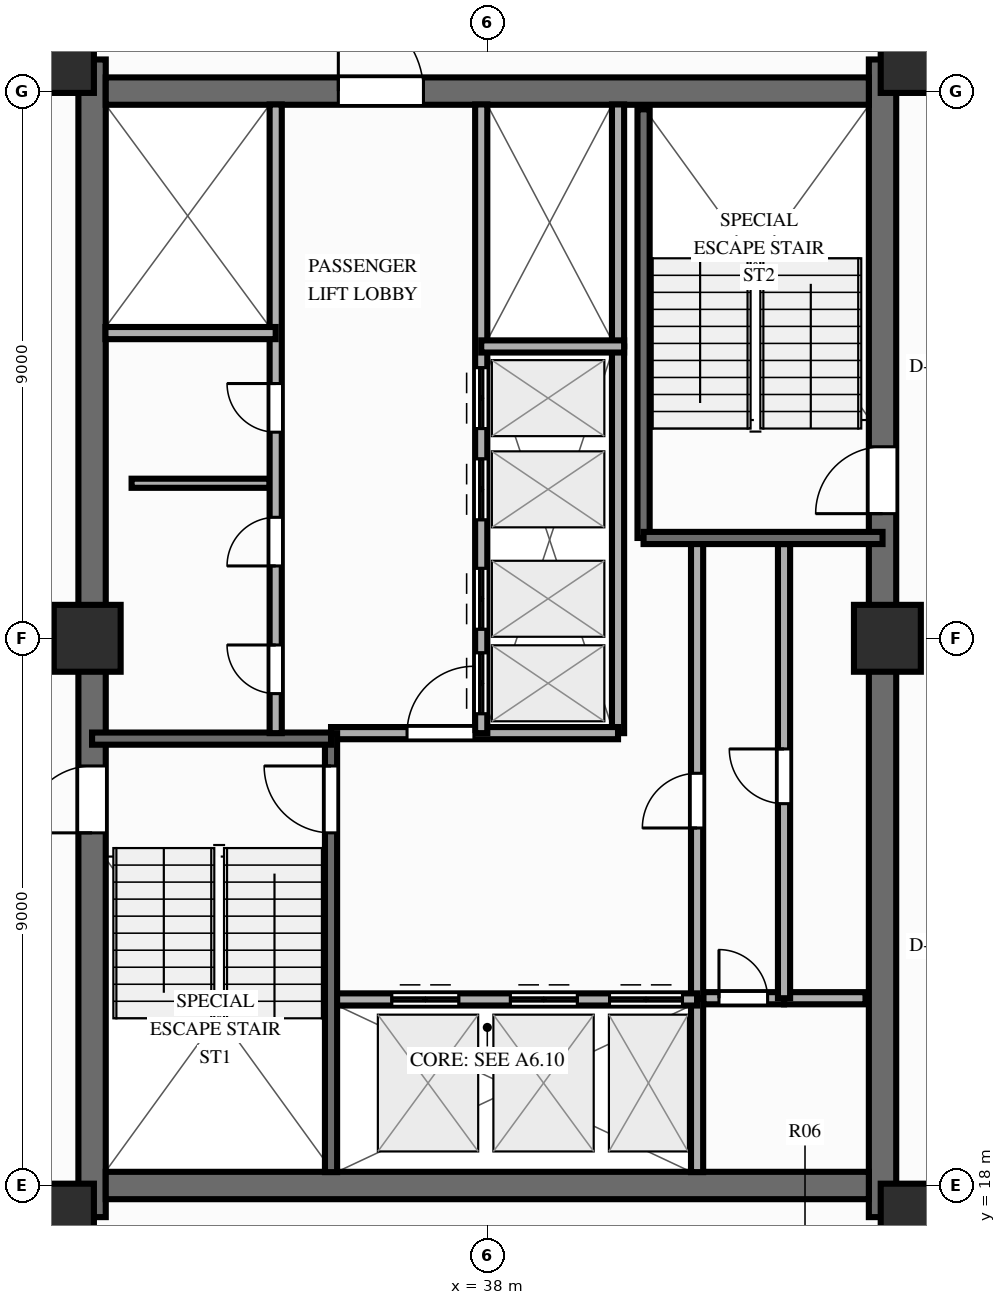
"""IFC4 building model, lengths in metres.
Left out: names, types, materials, properties, quantities, classifications, styles, units other than length and angle.
Written with IfcOpenShell. Run it as: python <this file> out.ifc"""

import sys

from ifc_helpers import new_model, si_unit, direction, frame, frame_2d, origin, origin_2d, place, context, subcontext, project, spatial, rectangle, extrude, source, transform, mapped, element, fill, save


model = new_model("IFC4")
c1 = context("Model", 3, precision=1e-05, world=origin(), true_north=direction((0.0, 1.0)))
c2 = subcontext(c1, "Body", "Model", "MODEL_VIEW")
j1 = project(units=[si_unit("LENGTHUNIT", "METRE"), si_unit("PLANEANGLEUNIT", "RADIAN")], contexts=[c1])
p1 = place(None, origin())
s1 = spatial("IfcSite", under=j1, at=p1, CompositionType="ELEMENT")
p2 = place(p1, origin())
s2 = spatial("IfcBuilding", under=s1, at=p2, CompositionType="ELEMENT")
p3 = place(p2, frame((0.0, 0.0, 152.2)))
s3 = spatial("IfcBuildingStorey", under=s2, at=p3, CompositionType="ELEMENT", Elevation=152.2)
p4 = place(p3, frame((31.5, 17.48, 0.0), z_axis=(0.0, 0.0, 1.0), x_axis=(0.0, 1.0, 0.0)))
e1 = element("IfcWall", 1, at=p4, inside=s3, PredefinedType="SHEAR", context=c2, shape_type="SweptSolid", body=[
    extrude(rectangle(XDim=19.04, YDim=0.45, at=frame_2d((9.52, 0.0))), origin(), (0.0, 0.0, 1.0), 3.9),
])
p5 = place(p4, frame((6.32, 0.0, 0.0)))
e2 = element("IfcOpeningElement", 2, at=p5, cuts=e1, PredefinedType="OPENING", context=c2, shape_type="SweptSolid", body=[
    extrude(rectangle(XDim=1.1, YDim=2.15, at=frame_2d((0.55, 1.075))), frame((0.0, 0.237, 0.0), z_axis=(0.0, -1.0, 0.0), x_axis=(1.0, 0.0, 0.0)), (0.0, 0.0, 1.0), 0.474),
])
p6 = place(p3, frame((44.5, 17.48, 0.0), z_axis=(0.0, 0.0, 1.0), x_axis=(0.0, 1.0, 0.0)))
e3 = element("IfcWall", 3, at=p6, inside=s3, PredefinedType="SHEAR", context=c2, shape_type="SweptSolid", body=[
    extrude(rectangle(XDim=19.04, YDim=0.45, at=frame_2d((9.52, 0.0))), origin(), (0.0, 0.0, 1.0), 3.9),
])
p7 = place(p6, frame((12.67, 0.0, 0.0), z_axis=(0.0, 0.0, 1.0), x_axis=(-1.0, 0.0, 0.0)))
e4 = element("IfcOpeningElement", 4, at=p7, cuts=e3, PredefinedType="OPENING", context=c2, shape_type="SweptSolid", body=[
    extrude(rectangle(XDim=1.1, YDim=2.15, at=frame_2d((0.55, 1.075))), frame((0.0, 0.237, 0.0), z_axis=(0.0, -1.0, 0.0), x_axis=(1.0, 0.0, 0.0)), (0.0, 0.0, 1.0), 0.474),
])
p8 = place(p3, frame((31.725, 18.0, 0.0), z_axis=(0.0, 0.0, 1.0), x_axis=(1.0, 0.0, 0.0)))
e5 = element("IfcWall", 5, at=p8, inside=s3, PredefinedType="SHEAR", context=c2, shape_type="SweptSolid", body=[
    extrude(rectangle(XDim=12.55, YDim=0.45, at=frame_2d((6.275, 0.0))), origin(), (0.0, 0.0, 1.0), 3.9),
])
p9 = place(p3, frame((31.725, 36.0, 0.0), z_axis=(0.0, 0.0, 1.0), x_axis=(1.0, 0.0, 0.0)))
e6 = element("IfcWall", 6, at=p9, inside=s3, PredefinedType="SHEAR", context=c2, shape_type="SweptSolid", body=[
    extrude(rectangle(XDim=12.55, YDim=0.45, at=frame_2d((6.275, 0.0))), origin(), (0.0, 0.0, 1.0), 3.9),
])
p10 = place(p9, frame((5.225, 0.0, 0.0), z_axis=(0.0, 0.0, 1.0), x_axis=(-1.0, 0.0, 0.0)))
e7 = element("IfcOpeningElement", 7, at=p10, cuts=e6, PredefinedType="OPENING", context=c2, shape_type="SweptSolid", body=[
    extrude(rectangle(XDim=1.4, YDim=2.15, at=frame_2d((0.7, 1.075))), frame((0.0, 0.237, 0.0), z_axis=(0.0, -1.0, 0.0), x_axis=(1.0, 0.0, 0.0)), (0.0, 0.0, 1.0), 0.474),
])
m1 = source(origin(), c2, "Body", "SweptSolid", [
    extrude(rectangle(XDim=1.1, YDim=1.1, at=origin_2d()), origin(), (0.0, 0.0, 1.0), 3.9),
])
for number, where, z_axis, x_axis in (
    (8, (30.98, 17.48, 0.0), (0.0, 0.0, 1.0), (1.0, 0.0, 0.0)),
    (9, (45.02, 17.48, 0.0), (0.0, 0.0, 1.0), (1.0, 0.0, 0.0)),
    (10, (30.98, 36.52, 0.0), (0.0, 0.0, 1.0), (1.0, 0.0, 0.0)),
    (11, (45.02, 36.52, 0.0), (0.0, 0.0, 1.0), (1.0, 0.0, 0.0)),
    (12, (31.42, 27.0, 0.0), (0.0, 0.0, 1.0), (1.0, 0.0, 0.0)),
    (13, (44.58, 27.0, 0.0), (0.0, 0.0, 1.0), (1.0, 0.0, 0.0)),
):
    element("IfcColumn", number, at=place(p3, frame(where, z_axis=z_axis, x_axis=x_axis)), inside=s3, PredefinedType="COLUMN", context=c2, shape_type="MappedRepresentation", body=[
        mapped(m1, transform((0.0, 0.0, 0.0), scale=1.0)),
    ])
p11 = place(p3, frame((32.15, 29.55, 0.0), z_axis=(0.0, 0.0, 1.0), x_axis=(1.0, 0.0, 0.0)))
e14 = element("IfcWall", 14, at=p11, inside=s3, PredefinedType="PARTITIONING", context=c2, shape_type="SweptSolid", body=[
    extrude(rectangle(XDim=2.27, YDim=0.15, at=frame_2d((1.135, 0.0))), origin(), (0.0, 0.0, 1.0), 3.56),
])
p12 = place(p3, frame((41.55, 21.08, 0.0), z_axis=(0.0, 0.0, 1.0), x_axis=(1.0, 0.0, 0.0)))
e15 = element("IfcWall", 15, at=p12, inside=s3, PredefinedType="PARTITIONING", context=c2, shape_type="SweptSolid", body=[
    extrude(rectangle(XDim=1.33, YDim=0.2, at=frame_2d((0.665, 0.0))), origin(), (0.0, 0.0, 1.0), 3.56),
])
p13 = place(p12, frame((0.26, 0.0, 0.0)))
e16 = element("IfcOpeningElement", 16, at=p13, cuts=e15, PredefinedType="OPENING", context=c2, shape_type="SweptSolid", body=[
    extrude(rectangle(XDim=0.8, YDim=2.05, at=frame_2d((0.4, 1.025))), frame((0.0, 0.112, 0.0), z_axis=(0.0, -1.0, 0.0), x_axis=(1.0, 0.0, 0.0)), (0.0, 0.0, 1.0), 0.224),
])
p14 = place(p3, frame((42.88, 21.08, 0.0), z_axis=(0.0, 0.0, 1.0), x_axis=(1.0, 0.0, 0.0)))
e17 = element("IfcWall", 17, at=p14, inside=s3, PredefinedType="PARTITIONING", context=c2, shape_type="SweptSolid", body=[
    extrude(rectangle(XDim=1.34, YDim=0.2, at=frame_2d((0.67, 0.0))), origin(), (0.0, 0.0, 1.0), 3.56),
])
p15 = place(p3, frame((42.88, 21.08, 0.0), z_axis=(0.0, 0.0, 1.0), x_axis=(0.0, 1.0, 0.0)))
e18 = element("IfcWall", 18, at=p15, inside=s3, PredefinedType="PARTITIONING", context=c2, shape_type="SweptSolid", body=[
    extrude(rectangle(XDim=7.47, YDim=0.2, at=frame_2d((3.735, 0.0))), origin(), (0.0, 0.0, 1.0), 3.56),
])
p16 = place(p15, frame((3.2, 0.0, 0.0)))
e19 = element("IfcOpeningElement", 19, at=p16, cuts=e18, PredefinedType="OPENING", context=c2, shape_type="SweptSolid", body=[
    extrude(rectangle(XDim=0.9, YDim=2.1, at=frame_2d((0.45, 1.05))), frame((0.0, 0.112, 0.0), z_axis=(0.0, -1.0, 0.0), x_axis=(1.0, 0.0, 0.0)), (0.0, 0.0, 1.0), 0.224),
])
p17 = place(p3, frame((41.45, 18.22, 0.0), z_axis=(0.0, 0.0, 1.0), x_axis=(0.0, 1.0, 0.0)))
e20 = element("IfcWall", 20, at=p17, inside=s3, PredefinedType="PARTITIONING", context=c2, shape_type="SweptSolid", body=[
    extrude(rectangle(XDim=2.86, YDim=0.2, at=frame_2d((1.43, 0.0))), origin(), (0.0, 0.0, 1.0), 3.56),
])
p18 = place(p3, frame((41.45, 21.08, 0.0), z_axis=(0.0, 0.0, 1.0), x_axis=(0.0, 1.0, 0.0)))
e21 = element("IfcWall", 21, at=p18, inside=s3, PredefinedType="PARTITIONING", context=c2, shape_type="SweptSolid", body=[
    extrude(rectangle(XDim=7.52, YDim=0.2, at=frame_2d((3.76, 0.0))), origin(), (0.0, 0.0, 1.0), 3.56),
])
p19 = place(p18, frame((2.8, 0.0, 0.0)))
e22 = element("IfcOpeningElement", 22, at=p19, cuts=e21, PredefinedType="OPENING", context=c2, shape_type="SweptSolid", body=[
    extrude(rectangle(XDim=0.9, YDim=2.1, at=frame_2d((0.45, 1.05))), frame((0.0, 0.112, 0.0), z_axis=(0.0, -1.0, 0.0), x_axis=(1.0, 0.0, 0.0)), (0.0, 0.0, 1.0), 0.224),
])
p20 = place(p3, frame((40.15, 25.44, 0.0), z_axis=(0.0, 0.0, 1.0), x_axis=(0.0, 1.0, 0.0)))
e23 = element("IfcWall", 23, at=p20, inside=s3, PredefinedType="PARTITIONING", context=c2, shape_type="SweptSolid", body=[
    extrude(rectangle(XDim=6.36, YDim=0.2, at=frame_2d((3.18, 0.0))), origin(), (0.0, 0.0, 1.0), 3.56),
])
p21 = place(p3, frame((40.15, 31.8, 0.0), z_axis=(0.0, 0.0, 1.0), x_axis=(0.0, 1.0, 0.0)))
e24 = element("IfcWall", 24, at=p21, inside=s3, PredefinedType="PARTITIONING", context=c2, shape_type="SweptSolid", body=[
    extrude(rectangle(XDim=3.98, YDim=0.2, at=frame_2d((1.99, 0.0))), origin(), (0.0, 0.0, 1.0), 3.56),
])
p22 = place(p3, frame((35.43, 21.06, 0.0), z_axis=(0.0, 0.0, 1.0), x_axis=(1.0, 0.0, 0.0)))
e25 = element("IfcWall", 25, at=p22, inside=s3, PredefinedType="PARTITIONING", context=c2, shape_type="SweptSolid", body=[
    extrude(rectangle(XDim=6.02, YDim=0.2, at=frame_2d((3.01, 0.0))), origin(), (0.0, 0.0, 1.0), 3.56),
])
p23 = place(p22, frame((1.0, 0.0, 0.0)))
e26 = element("IfcOpeningElement", 26, at=p23, cuts=e25, PredefinedType="OPENING", context=c2, shape_type="SweptSolid", body=[
    extrude(rectangle(XDim=1.1, YDim=2.15, at=frame_2d((0.55, 1.075))), frame((0.0, 0.112, 0.0), z_axis=(0.0, -1.0, 0.0), x_axis=(1.0, 0.0, 0.0)), (0.0, 0.0, 1.0), 0.224),
])
p24 = place(p22, frame((2.95, 0.0, 0.0)))
e27 = element("IfcOpeningElement", 27, at=p24, cuts=e25, PredefinedType="OPENING", context=c2, shape_type="SweptSolid", body=[
    extrude(rectangle(XDim=1.1, YDim=2.15, at=frame_2d((0.55, 1.075))), frame((0.0, 0.112, 0.0), z_axis=(0.0, -1.0, 0.0), x_axis=(1.0, 0.0, 0.0)), (0.0, 0.0, 1.0), 0.224),
])
p25 = place(p22, frame((4.58, 0.0, 0.0)))
e28 = element("IfcOpeningElement", 28, at=p25, cuts=e25, PredefinedType="OPENING", context=c2, shape_type="SweptSolid", body=[
    extrude(rectangle(XDim=1.2, YDim=2.15, at=frame_2d((0.6, 1.075))), frame((0.0, 0.112, 0.0), z_axis=(0.0, -1.0, 0.0), x_axis=(1.0, 0.0, 0.0)), (0.0, 0.0, 1.0), 0.224),
])
p26 = place(p3, frame((35.43, 25.44, 0.0), z_axis=(0.0, 0.0, 1.0), x_axis=(1.0, 0.0, 0.0)))
e29 = element("IfcWall", 29, at=p26, inside=s3, PredefinedType="PARTITIONING", context=c2, shape_type="SweptSolid", body=[
    extrude(rectangle(XDim=4.72, YDim=0.2, at=frame_2d((2.36, 0.0))), origin(), (0.0, 0.0, 1.0), 3.56),
])
p27 = place(p26, frame((1.25, 0.0, 0.0)))
e30 = element("IfcOpeningElement", 30, at=p27, cuts=e29, PredefinedType="OPENING", context=c2, shape_type="SweptSolid", body=[
    extrude(rectangle(XDim=1.1, YDim=2.15, at=frame_2d((0.55, 1.075))), frame((0.0, 0.112, 0.0), z_axis=(0.0, -1.0, 0.0), x_axis=(1.0, 0.0, 0.0)), (0.0, 0.0, 1.0), 0.224),
])
p28 = place(p3, frame((35.43, 18.22, 0.0), z_axis=(0.0, 0.0, 1.0), x_axis=(0.0, 1.0, 0.0)))
e31 = element("IfcWall", 31, at=p28, inside=s3, PredefinedType="SOLIDWALL", context=c2, shape_type="SweptSolid", body=[
    extrude(rectangle(XDim=7.22, YDim=0.2, at=frame_2d((3.61, 0.0))), origin(), (0.0, 0.0, 1.0), 3.69),
])
p29 = place(p28, frame((6.68, 0.0, 0.0), z_axis=(0.0, 0.0, 1.0), x_axis=(-1.0, 0.0, 0.0)))
e32 = element("IfcOpeningElement", 32, at=p29, cuts=e31, PredefinedType="OPENING", context=c2, shape_type="SweptSolid", body=[
    extrude(rectangle(XDim=1.1, YDim=2.15, at=frame_2d((0.55, 1.075))), frame((0.0, 0.112, 0.0), z_axis=(0.0, -1.0, 0.0), x_axis=(1.0, 0.0, 0.0)), (0.0, 0.0, 1.0), 0.224),
])
p30 = place(p3, frame((31.5, 25.35, 0.0), z_axis=(0.0, 0.0, 1.0), x_axis=(1.0, 0.0, 0.0)))
e33 = element("IfcWall", 33, at=p30, inside=s3, PredefinedType="SOLIDWALL", context=c2, shape_type="SweptSolid", body=[
    extrude(rectangle(XDim=3.93, YDim=0.2, at=frame_2d((1.965, 0.0))), origin(), (0.0, 0.0, 1.0), 3.69),
])
p31 = place(p3, frame((40.57, 28.65, 0.0), z_axis=(0.0, 0.0, 1.0), x_axis=(0.0, 1.0, 0.0)))
e34 = element("IfcWall", 34, at=p31, inside=s3, PredefinedType="SOLIDWALL", context=c2, shape_type="SweptSolid", body=[
    extrude(rectangle(XDim=7.05, YDim=0.2, at=frame_2d((3.525, 0.0))), origin(), (0.0, 0.0, 1.0), 3.69),
])
p32 = place(p3, frame((40.57, 28.65, 0.0), z_axis=(0.0, 0.0, 1.0), x_axis=(1.0, 0.0, 0.0)))
e35 = element("IfcWall", 35, at=p32, inside=s3, PredefinedType="SOLIDWALL", context=c2, shape_type="SweptSolid", body=[
    extrude(rectangle(XDim=3.93, YDim=0.2, at=frame_2d((1.965, 0.0))), origin(), (0.0, 0.0, 1.0), 3.69),
])
p33 = place(p3, frame((34.52, 25.44, 0.0), z_axis=(0.0, 0.0, 1.0), x_axis=(0.0, 1.0, 0.0)))
e36 = element("IfcWall", 36, at=p33, inside=s3, PredefinedType="PARTITIONING", context=c2, shape_type="SweptSolid", body=[
    extrude(rectangle(XDim=10.34, YDim=0.2, at=frame_2d((5.17, 0.0))), origin(), (0.0, 0.0, 1.0), 3.56),
])
p34 = place(p33, frame((0.65, 0.0, 0.0)))
e37 = element("IfcOpeningElement", 37, at=p34, cuts=e36, PredefinedType="OPENING", context=c2, shape_type="SweptSolid", body=[
    extrude(rectangle(XDim=0.8, YDim=2.05, at=frame_2d((0.4, 1.025))), frame((0.0, 0.112, 0.0), z_axis=(0.0, -1.0, 0.0), x_axis=(1.0, 0.0, 0.0)), (0.0, 0.0, 1.0), 0.224),
])
p35 = place(p33, frame((2.75, 0.0, 0.0)))
e38 = element("IfcOpeningElement", 38, at=p35, cuts=e36, PredefinedType="OPENING", context=c2, shape_type="SweptSolid", body=[
    extrude(rectangle(XDim=0.8, YDim=2.05, at=frame_2d((0.4, 1.025))), frame((0.0, 0.112, 0.0), z_axis=(0.0, -1.0, 0.0), x_axis=(1.0, 0.0, 0.0)), (0.0, 0.0, 1.0), 0.224),
])
p36 = place(p33, frame((4.95, 0.0, 0.0)))
e39 = element("IfcOpeningElement", 39, at=p36, cuts=e36, PredefinedType="OPENING", context=c2, shape_type="SweptSolid", body=[
    extrude(rectangle(XDim=0.8, YDim=2.05, at=frame_2d((0.4, 1.025))), frame((0.0, 0.112, 0.0), z_axis=(0.0, -1.0, 0.0), x_axis=(1.0, 0.0, 0.0)), (0.0, 0.0, 1.0), 0.224),
])
p37 = place(p3, frame((31.72, 32.02, 0.0), z_axis=(0.0, 0.0, 1.0), x_axis=(1.0, 0.0, 0.0)))
e40 = element("IfcWall", 40, at=p37, inside=s3, PredefinedType="PARTITIONING", context=c2, shape_type="SweptSolid", body=[
    extrude(rectangle(XDim=2.8, YDim=0.2, at=frame_2d((1.4, 0.0))), origin(), (0.0, 0.0, 1.0), 3.56),
])
p38 = place(p3, frame((37.9, 25.44, 0.0), z_axis=(0.0, 0.0, 1.0), x_axis=(0.0, 1.0, 0.0)))
e41 = element("IfcWall", 41, at=p38, inside=s3, PredefinedType="PARTITIONING", context=c2, shape_type="SweptSolid", body=[
    extrude(rectangle(XDim=10.34, YDim=0.2, at=frame_2d((5.17, 0.0))), origin(), (0.0, 0.0, 1.0), 3.56),
])
p39 = place(p38, frame((0.32, 0.0, 0.0)))
e42 = element("IfcOpeningElement", 42, at=p39, cuts=e41, PredefinedType="OPENING", context=c2, shape_type="SweptSolid", body=[
    extrude(rectangle(XDim=1.0, YDim=2.15, at=frame_2d((0.5, 1.075))), frame((0.0, 0.112, 0.0), z_axis=(0.0, -1.0, 0.0), x_axis=(1.0, 0.0, 0.0)), (0.0, 0.0, 1.0), 0.224),
])
p40 = place(p38, frame((1.71, 0.0, 0.0)))
e43 = element("IfcOpeningElement", 43, at=p40, cuts=e41, PredefinedType="OPENING", context=c2, shape_type="SweptSolid", body=[
    extrude(rectangle(XDim=1.0, YDim=2.15, at=frame_2d((0.5, 1.075))), frame((0.0, 0.112, 0.0), z_axis=(0.0, -1.0, 0.0), x_axis=(1.0, 0.0, 0.0)), (0.0, 0.0, 1.0), 0.224),
])
p41 = place(p38, frame((3.51, 0.0, 0.0)))
e44 = element("IfcOpeningElement", 44, at=p41, cuts=e41, PredefinedType="OPENING", context=c2, shape_type="SweptSolid", body=[
    extrude(rectangle(XDim=1.0, YDim=2.15, at=frame_2d((0.5, 1.075))), frame((0.0, 0.112, 0.0), z_axis=(0.0, -1.0, 0.0), x_axis=(1.0, 0.0, 0.0)), (0.0, 0.0, 1.0), 0.224),
])
p42 = place(p38, frame((5.01, 0.0, 0.0)))
e45 = element("IfcOpeningElement", 45, at=p42, cuts=e41, PredefinedType="OPENING", context=c2, shape_type="SweptSolid", body=[
    extrude(rectangle(XDim=1.0, YDim=2.15, at=frame_2d((0.5, 1.075))), frame((0.0, 0.112, 0.0), z_axis=(0.0, -1.0, 0.0), x_axis=(1.0, 0.0, 0.0)), (0.0, 0.0, 1.0), 0.224),
])
p43 = place(p3, frame((37.9, 31.8, 0.0), z_axis=(0.0, 0.0, 1.0), x_axis=(1.0, 0.0, 0.0)))
e46 = element("IfcWall", 46, at=p43, inside=s3, PredefinedType="PARTITIONING", context=c2, shape_type="SweptSolid", body=[
    extrude(rectangle(XDim=2.35, YDim=0.2, at=frame_2d((1.175, 0.0))), origin(), (0.0, 0.0, 1.0), 3.56),
])
m2 = source(origin(), c2, "Body", "SweptSolid", [
    extrude(rectangle(XDim=1.1, YDim=2.15, at=frame_2d((0.55, 1.075))), frame((0.0, 0.025, 0.0), z_axis=(0.0, -1.0, 0.0), x_axis=(1.0, 0.0, 0.0)), (0.0, 0.0, 1.0), 0.05),
])
p44 = place(p5, origin())
e47 = element("IfcDoor", 47, at=p44, inside=s3, OperationType="SINGLE_SWING_LEFT", PredefinedType="DOOR", context=c2, shape_type="MappedRepresentation", body=[
    mapped(m2, transform((0.0, 0.0, 0.0), scale=1.0)),
])
fill(e2, e47)
p45 = place(p7, origin())
e48 = element("IfcDoor", 48, at=p45, inside=s3, OperationType="SINGLE_SWING_RIGHT", PredefinedType="DOOR", context=c2, shape_type="MappedRepresentation", body=[
    mapped(m2, transform((0.0, 0.0, 0.0), scale=1.0)),
])
fill(e4, e48)
m3 = source(origin(), c2, "Body", "SweptSolid", [
    extrude(rectangle(XDim=1.4, YDim=2.15, at=frame_2d((0.7, 1.075))), frame((0.0, 0.025, 0.0), z_axis=(0.0, -1.0, 0.0), x_axis=(1.0, 0.0, 0.0)), (0.0, 0.0, 1.0), 0.05),
])
p46 = place(p10, origin())
e49 = element("IfcDoor", 49, at=p46, inside=s3, OperationType="SINGLE_SWING_RIGHT", PredefinedType="DOOR", context=c2, shape_type="MappedRepresentation", body=[
    mapped(m3, transform((0.0, 0.0, 0.0), scale=1.0)),
])
fill(e7, e49)
m4 = source(origin(), c2, "Body", "SweptSolid", [
    extrude(rectangle(XDim=0.8, YDim=2.05, at=frame_2d((0.4, 1.025))), frame((0.0, 0.025, 0.0), z_axis=(0.0, -1.0, 0.0), x_axis=(1.0, 0.0, 0.0)), (0.0, 0.0, 1.0), 0.05),
])
p47 = place(p13, origin())
e50 = element("IfcDoor", 50, at=p47, inside=s3, OperationType="SINGLE_SWING_LEFT", PredefinedType="DOOR", context=c2, shape_type="MappedRepresentation", body=[
    mapped(m4, transform((0.0, 0.0, 0.0), scale=1.0)),
])
fill(e16, e50)
m5 = source(origin(), c2, "Body", "SweptSolid", [
    extrude(rectangle(XDim=0.9, YDim=2.1, at=frame_2d((0.45, 1.05))), frame((0.0, 0.025, 0.0), z_axis=(0.0, -1.0, 0.0), x_axis=(1.0, 0.0, 0.0)), (0.0, 0.0, 1.0), 0.05),
])
p48 = place(p16, origin())
e51 = element("IfcDoor", 51, at=p48, inside=s3, OperationType="SINGLE_SWING_RIGHT", PredefinedType="DOOR", context=c2, shape_type="MappedRepresentation", body=[
    mapped(m5, transform((0.0, 0.0, 0.0), scale=1.0)),
])
fill(e19, e51)
p49 = place(p19, origin())
e52 = element("IfcDoor", 52, at=p49, inside=s3, OperationType="SINGLE_SWING_LEFT", PredefinedType="DOOR", context=c2, shape_type="MappedRepresentation", body=[
    mapped(m5, transform((0.0, 0.0, 0.0), scale=1.0)),
])
fill(e22, e52)
p50 = place(p23, origin())
e53 = element("IfcDoor", 53, at=p50, inside=s3, OperationType="DOUBLE_DOOR_SLIDING", PredefinedType="DOOR", context=c2, shape_type="MappedRepresentation", body=[
    mapped(m2, transform((0.0, 0.0, 0.0), scale=1.0)),
])
fill(e26, e53)
p51 = place(p24, origin())
e54 = element("IfcDoor", 54, at=p51, inside=s3, OperationType="DOUBLE_DOOR_SLIDING", PredefinedType="DOOR", context=c2, shape_type="MappedRepresentation", body=[
    mapped(m2, transform((0.0, 0.0, 0.0), scale=1.0)),
])
fill(e27, e54)
m6 = source(origin(), c2, "Body", "SweptSolid", [
    extrude(rectangle(XDim=1.2, YDim=2.15, at=frame_2d((0.6, 1.075))), frame((0.0, 0.025, 0.0), z_axis=(0.0, -1.0, 0.0), x_axis=(1.0, 0.0, 0.0)), (0.0, 0.0, 1.0), 0.05),
])
p52 = place(p25, origin())
e55 = element("IfcDoor", 55, at=p52, inside=s3, OperationType="DOUBLE_DOOR_SLIDING", PredefinedType="DOOR", context=c2, shape_type="MappedRepresentation", body=[
    mapped(m6, transform((0.0, 0.0, 0.0), scale=1.0)),
])
fill(e28, e55)
p53 = place(p27, origin())
e56 = element("IfcDoor", 56, at=p53, inside=s3, OperationType="SINGLE_SWING_RIGHT", PredefinedType="DOOR", context=c2, shape_type="MappedRepresentation", body=[
    mapped(m2, transform((0.0, 0.0, 0.0), scale=1.0)),
])
fill(e30, e56)
p54 = place(p29, origin())
e57 = element("IfcDoor", 57, at=p54, inside=s3, OperationType="SINGLE_SWING_LEFT", PredefinedType="DOOR", context=c2, shape_type="MappedRepresentation", body=[
    mapped(m2, transform((0.0, 0.0, 0.0), scale=1.0)),
])
fill(e32, e57)
p55 = place(p34, origin())
e58 = element("IfcDoor", 58, at=p55, inside=s3, OperationType="SINGLE_SWING_RIGHT", PredefinedType="DOOR", context=c2, shape_type="MappedRepresentation", body=[
    mapped(m4, transform((0.0, 0.0, 0.0), scale=1.0)),
])
fill(e37, e58)
p56 = place(p35, origin())
e59 = element("IfcDoor", 59, at=p56, inside=s3, OperationType="SINGLE_SWING_LEFT", PredefinedType="DOOR", context=c2, shape_type="MappedRepresentation", body=[
    mapped(m4, transform((0.0, 0.0, 0.0), scale=1.0)),
])
fill(e38, e59)
p57 = place(p36, origin())
e60 = element("IfcDoor", 60, at=p57, inside=s3, OperationType="SINGLE_SWING_RIGHT", PredefinedType="DOOR", context=c2, shape_type="MappedRepresentation", body=[
    mapped(m4, transform((0.0, 0.0, 0.0), scale=1.0)),
])
fill(e39, e60)
m7 = source(origin(), c2, "Body", "SweptSolid", [
    extrude(rectangle(XDim=1.0, YDim=2.15, at=frame_2d((0.5, 1.075))), frame((0.0, 0.025, 0.0), z_axis=(0.0, -1.0, 0.0), x_axis=(1.0, 0.0, 0.0)), (0.0, 0.0, 1.0), 0.05),
])
p58 = place(p39, origin())
e61 = element("IfcDoor", 61, at=p58, inside=s3, OperationType="DOUBLE_DOOR_SLIDING", PredefinedType="DOOR", context=c2, shape_type="MappedRepresentation", body=[
    mapped(m7, transform((0.0, 0.0, 0.0), scale=1.0)),
])
fill(e42, e61)
p59 = place(p40, origin())
e62 = element("IfcDoor", 62, at=p59, inside=s3, OperationType="DOUBLE_DOOR_SLIDING", PredefinedType="DOOR", context=c2, shape_type="MappedRepresentation", body=[
    mapped(m7, transform((0.0, 0.0, 0.0), scale=1.0)),
])
fill(e43, e62)
p60 = place(p41, origin())
e63 = element("IfcDoor", 63, at=p60, inside=s3, OperationType="DOUBLE_DOOR_SLIDING", PredefinedType="DOOR", context=c2, shape_type="MappedRepresentation", body=[
    mapped(m7, transform((0.0, 0.0, 0.0), scale=1.0)),
])
fill(e44, e63)
p61 = place(p42, origin())
e64 = element("IfcDoor", 64, at=p61, inside=s3, OperationType="DOUBLE_DOOR_SLIDING", PredefinedType="DOOR", context=c2, shape_type="MappedRepresentation", body=[
    mapped(m7, transform((0.0, 0.0, 0.0), scale=1.0)),
])
fill(e45, e64)
save(model, sys.argv[1])
